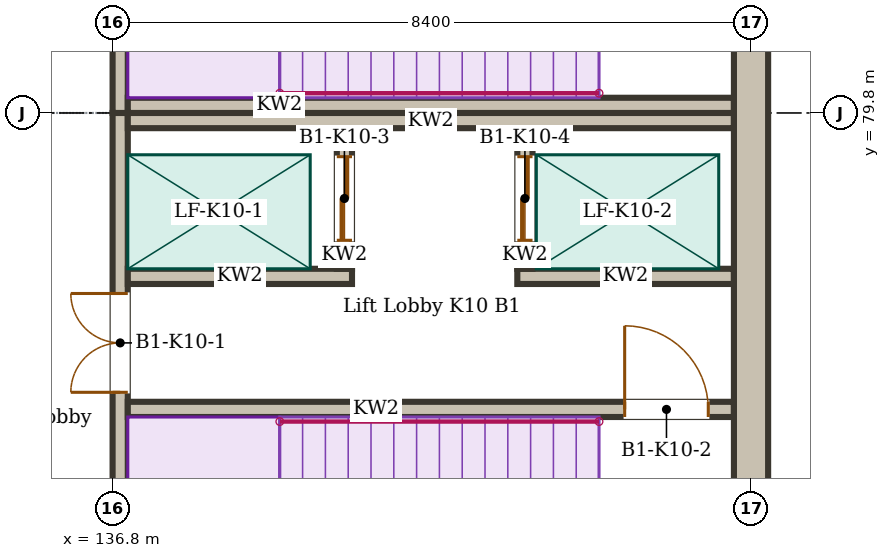
"""IFC4 building model, lengths in metres.
Left out: names, types, materials, properties, quantities, classifications, styles, units other than length and angle.
Written with IfcOpenShell. Run it as: python <this file> out.ifc"""

import sys

from ifc_helpers import new_model, si_unit, direction, frame, frame_2d, origin, place, context, subcontext, project, spatial, rectangle, extrude, element, fill, save


model = new_model("IFC4")
c1 = context("Model", 3, precision=1e-05, world=origin(), true_north=direction((0.0, 1.0)))
c2 = subcontext(c1, "Body", "Model", "MODEL_VIEW")
j1 = project(units=[si_unit("LENGTHUNIT", "METRE"), si_unit("PLANEANGLEUNIT", "RADIAN")], contexts=[c1])
p1 = place(None, origin())
s1 = spatial("IfcSite", under=j1, at=p1, CompositionType="ELEMENT")
p2 = place(p1, origin())
s2 = spatial("IfcBuilding", under=s1, at=p2, CompositionType="ELEMENT")
p3 = place(p2, frame((0.0, 0.0, -4.5)))
s3 = spatial("IfcBuildingStorey", under=s2, at=p3, CompositionType="ELEMENT", Elevation=-4.5)
p4 = place(p3, frame((145.2, 29.4, 0.0), z_axis=(0.0, 0.0, 1.0), x_axis=(0.0, 1.0, 0.0)))
e1 = element("IfcWall", 1, at=p4, inside=s3, PredefinedType="SOLIDWALL", context=c2, shape_type="SweptSolid", body=[
    extrude(rectangle(XDim=75.6, YDim=0.45, at=frame_2d((37.8, 0.0))), origin(), (0.0, 0.0, 1.0), 4.35),
])
p5 = place(p3, frame((136.9, 71.4, 0.0), z_axis=(0.0, 0.0, 1.0), x_axis=(0.0, 1.0, 0.0)))
e2 = element("IfcWall", 2, at=p5, inside=s3, PredefinedType="SOLIDWALL", context=c2, shape_type="SweptSolid", body=[
    extrude(rectangle(XDim=8.4, YDim=0.2, at=frame_2d((4.2, 0.0))), origin(), (0.0, 0.0, 1.0), 4.5),
])
p6 = place(p5, frame((4.725, 0.0, 0.0)))
e3 = element("IfcOpeningElement", 3, at=p6, cuts=e2, PredefinedType="OPENING", context=c2, shape_type="SweptSolid", body=[
    extrude(rectangle(XDim=1.3, YDim=2.1, at=frame_2d((0.65, 1.05))), frame((0.0, 0.11, 0.0), z_axis=(0.0, -1.0, 0.0), x_axis=(1.0, 0.0, 0.0)), (0.0, 0.0, 1.0), 0.22),
])
p7 = place(p3, frame((137.0, 79.7, 0.0), z_axis=(0.0, 0.0, 1.0), x_axis=(1.0, 0.0, 0.0)))
e4 = element("IfcWall", 4, at=p7, inside=s3, PredefinedType="SOLIDWALL", context=c2, shape_type="SweptSolid", body=[
    extrude(rectangle(XDim=7.975, YDim=0.2, at=frame_2d((3.988, 0.0))), origin(), (0.0, 0.0, 1.0), 4.5),
])
p8 = place(p3, frame((137.0, 75.9, 0.0), z_axis=(0.0, 0.0, 1.0), x_axis=(1.0, 0.0, 0.0)))
e5 = element("IfcWall", 5, at=p8, inside=s3, PredefinedType="SOLIDWALL", context=c2, shape_type="SweptSolid", body=[
    extrude(rectangle(XDim=7.975, YDim=0.2, at=frame_2d((3.988, 0.0))), origin(), (0.0, 0.0, 1.0), 4.5),
])
p9 = place(p8, frame((6.538, 0.0, 0.0)))
e6 = element("IfcOpeningElement", 6, at=p9, cuts=e5, PredefinedType="OPENING", context=c2, shape_type="SweptSolid", body=[
    extrude(rectangle(XDim=1.1, YDim=2.1, at=frame_2d((0.55, 1.05))), frame((0.0, 0.11, 0.0), z_axis=(0.0, -1.0, 0.0), x_axis=(1.0, 0.0, 0.0)), (0.0, 0.0, 1.0), 0.22),
])
p10 = place(p3, frame((137.0, 77.65, 0.0), z_axis=(0.0, 0.0, 1.0), x_axis=(1.0, 0.0, 0.0)))
e7 = element("IfcWall", 7, at=p10, inside=s3, PredefinedType="SOLIDWALL", context=c2, shape_type="SweptSolid", body=[
    extrude(rectangle(XDim=2.95, YDim=0.2, at=frame_2d((1.475, 0.0))), origin(), (0.0, 0.0, 1.0), 4.5),
])
p11 = place(p3, frame((142.125, 77.65, 0.0), z_axis=(0.0, 0.0, 1.0), x_axis=(1.0, 0.0, 0.0)))
e8 = element("IfcWall", 8, at=p11, inside=s3, PredefinedType="SOLIDWALL", context=c2, shape_type="SweptSolid", body=[
    extrude(rectangle(XDim=2.85, YDim=0.2, at=frame_2d((1.425, 0.0))), origin(), (0.0, 0.0, 1.0), 4.5),
])
p12 = place(p3, frame((139.85, 77.75, 0.0), z_axis=(0.0, 0.0, 1.0), x_axis=(0.0, 1.0, 0.0)))
e9 = element("IfcWall", 9, at=p12, inside=s3, PredefinedType="SOLIDWALL", context=c2, shape_type="SweptSolid", body=[
    extrude(rectangle(XDim=1.85, YDim=0.2, at=frame_2d((0.925, 0.0))), origin(), (0.0, 0.0, 1.0), 4.5),
])
p13 = place(p12, frame((0.375, 0.0, 0.0)))
e10 = element("IfcOpeningElement", 10, at=p13, cuts=e9, PredefinedType="OPENING", context=c2, shape_type="SweptSolid", body=[
    extrude(rectangle(XDim=1.1, YDim=2.1, at=frame_2d((0.55, 1.05))), frame((0.0, 0.11, 0.0), z_axis=(0.0, -1.0, 0.0), x_axis=(1.0, 0.0, 0.0)), (0.0, 0.0, 1.0), 0.22),
])
p14 = place(p3, frame((142.225, 77.75, 0.0), z_axis=(0.0, 0.0, 1.0), x_axis=(0.0, 1.0, 0.0)))
e11 = element("IfcWall", 11, at=p14, inside=s3, PredefinedType="SOLIDWALL", context=c2, shape_type="SweptSolid", body=[
    extrude(rectangle(XDim=1.85, YDim=0.2, at=frame_2d((0.925, 0.0))), origin(), (0.0, 0.0, 1.0), 4.5),
])
p15 = place(p14, frame((0.375, 0.0, 0.0)))
e12 = element("IfcOpeningElement", 12, at=p15, cuts=e11, PredefinedType="OPENING", context=c2, shape_type="SweptSolid", body=[
    extrude(rectangle(XDim=1.1, YDim=2.1, at=frame_2d((0.55, 1.05))), frame((0.0, 0.11, 0.0), z_axis=(0.0, -1.0, 0.0), x_axis=(1.0, 0.0, 0.0)), (0.0, 0.0, 1.0), 0.22),
])
p16 = place(p3, frame((136.9, 79.8, 0.0), z_axis=(0.0, 0.0, 1.0), x_axis=(0.0, 1.0, 0.0)))
e13 = element("IfcWall", 13, at=p16, inside=s3, PredefinedType="SOLIDWALL", context=c2, shape_type="SweptSolid", body=[
    extrude(rectangle(XDim=8.4, YDim=0.2, at=frame_2d((4.2, 0.0))), origin(), (0.0, 0.0, 1.0), 4.5),
])
p17 = place(p16, frame((4.725, 0.0, 0.0)))
e14 = element("IfcOpeningElement", 14, at=p17, cuts=e13, PredefinedType="OPENING", context=c2, shape_type="SweptSolid", body=[
    extrude(rectangle(XDim=1.3, YDim=2.1, at=frame_2d((0.65, 1.05))), frame((0.0, 0.11, 0.0), z_axis=(0.0, -1.0, 0.0), x_axis=(1.0, 0.0, 0.0)), (0.0, 0.0, 1.0), 0.22),
])
p18 = place(p3, frame((137.0, 79.9, 0.0), z_axis=(0.0, 0.0, 1.0), x_axis=(1.0, 0.0, 0.0)))
e15 = element("IfcWall", 15, at=p18, inside=s3, PredefinedType="SOLIDWALL", context=c2, shape_type="SweptSolid", body=[
    extrude(rectangle(XDim=7.975, YDim=0.2, at=frame_2d((3.988, 0.0))), origin(), (0.0, 0.0, 1.0), 4.5),
])
p19 = place(p6, origin())
e16 = element("IfcDoor", 16, at=p19, inside=s3, OperationType="DOUBLE_DOOR_DOUBLE_SWING", PredefinedType="DOOR", context=c2, shape_type="SweptSolid", body=[
    extrude(rectangle(XDim=1.3, YDim=2.1, at=frame_2d((0.65, 1.05))), frame((0.0, 0.025, 0.0), z_axis=(0.0, -1.0, 0.0), x_axis=(1.0, 0.0, 0.0)), (0.0, 0.0, 1.0), 0.05),
])
fill(e3, e16)
p20 = place(p9, origin())
e17 = element("IfcDoor", 17, at=p20, inside=s3, OperationType="SINGLE_SWING_LEFT", PredefinedType="DOOR", context=c2, shape_type="SweptSolid", body=[
    extrude(rectangle(XDim=1.1, YDim=2.1, at=frame_2d((0.55, 1.05))), frame((0.0, 0.025, 0.0), z_axis=(0.0, -1.0, 0.0), x_axis=(1.0, 0.0, 0.0)), (0.0, 0.0, 1.0), 0.05),
])
fill(e6, e17)
p21 = place(p13, origin())
e18 = element("IfcDoor", 18, at=p21, inside=s3, OperationType="DOUBLE_DOOR_SLIDING", PredefinedType="DOOR", context=c2, shape_type="SweptSolid", body=[
    extrude(rectangle(XDim=1.1, YDim=2.1, at=frame_2d((0.55, 1.05))), frame((0.0, 0.025, 0.0), z_axis=(0.0, -1.0, 0.0), x_axis=(1.0, 0.0, 0.0)), (0.0, 0.0, 1.0), 0.05),
])
fill(e10, e18)
p22 = place(p15, origin())
e19 = element("IfcDoor", 19, at=p22, inside=s3, OperationType="DOUBLE_DOOR_SLIDING", PredefinedType="DOOR", context=c2, shape_type="SweptSolid", body=[
    extrude(rectangle(XDim=1.1, YDim=2.1, at=frame_2d((0.55, 1.05))), frame((0.0, 0.025, 0.0), z_axis=(0.0, -1.0, 0.0), x_axis=(1.0, 0.0, 0.0)), (0.0, 0.0, 1.0), 0.05),
])
fill(e12, e19)
save(model, sys.argv[1])
